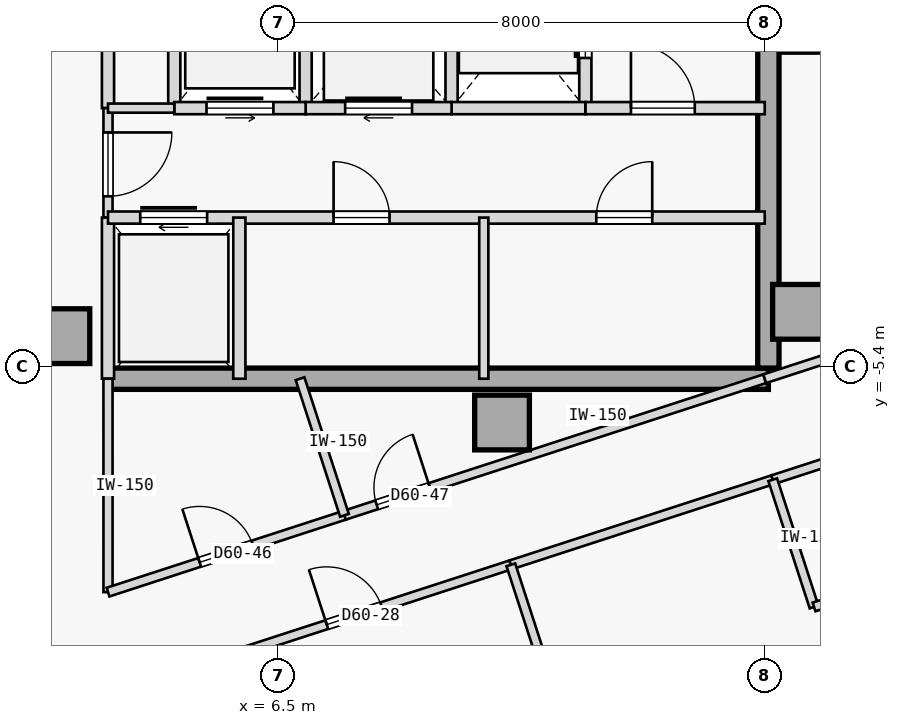
"""IFC4 building model, lengths in metres.
Left out: names, types, materials, properties, quantities, classifications, styles, units other than length and angle.
Written with IfcOpenShell. Run it as: python <this file> out.ifc"""

import sys

from ifc_helpers import new_model, si_unit, direction, frame, frame_2d, origin, origin_2d, place, context, subcontext, project, spatial, rectangle, extrude, element, fill, save


model = new_model("IFC4")
c1 = context("Model", 3, precision=1e-05, world=origin(), true_north=direction((0.0, 1.0)))
c2 = subcontext(c1, "Body", "Model", "MODEL_VIEW")
j1 = project(units=[si_unit("LENGTHUNIT", "METRE"), si_unit("PLANEANGLEUNIT", "RADIAN")], contexts=[c1])
p1 = place(None, origin())
s1 = spatial("IfcSite", under=j1, at=p1, CompositionType="ELEMENT")
p2 = place(p1, origin())
s2 = spatial("IfcBuilding", under=s1, at=p2, CompositionType="ELEMENT")
p3 = place(p2, frame((0.0, 0.0, 227.65)))
s3 = spatial("IfcBuildingStorey", under=s2, at=p3, CompositionType="ELEMENT", Elevation=227.65)
for number, where, z_axis, x_axis in (
    (1, (15.08, -4.5, 0.0), (0.0, 0.0, 1.0), (1.0, 0.0, 0.0)),
    (2, (10.18, -6.32, 0.0), (0.0, 0.0, 1.0), (1.0, 0.0, 0.0)),
    (3, (2.95, -4.9, 0.0), (0.0, 0.0, 1.0), (1.0, 0.0, 0.0)),
):
    element("IfcColumn", number, at=place(p3, frame(where, z_axis=z_axis, x_axis=x_axis)), inside=s3, PredefinedType="COLUMN", context=c2, shape_type="SweptSolid", body=[
        extrude(rectangle(XDim=0.9, YDim=0.9, at=origin_2d()), origin(), (0.0, 0.0, 1.0), 3.35),
    ])
p4 = place(p3, frame((3.7, -5.6, 0.0), z_axis=(0.0, 0.0, 1.0), x_axis=(1.0, 0.0, 0.0)))
e4 = element("IfcWall", 4, at=p4, inside=s3, PredefinedType="SHEAR", context=c2, shape_type="SweptSolid", body=[
    extrude(rectangle(XDim=10.86, YDim=0.35, at=frame_2d((5.43, 0.0))), origin(), (0.0, 0.0, 1.0), 3.125),
])
p5 = place(p3, frame((14.56, -5.425, 0.0), z_axis=(0.0, 0.0, 1.0), x_axis=(0.0, 1.0, 0.0)))
e5 = element("IfcWall", 5, at=p5, inside=s3, PredefinedType="SHEAR", context=c2, shape_type="SweptSolid", body=[
    extrude(rectangle(XDim=10.85, YDim=0.35, at=frame_2d((5.425, 0.0))), origin(), (0.0, 0.0, 1.0), 3.125),
])
p6 = place(p3, frame((3.7, -1.15, 0.0), z_axis=(0.0, 0.0, 1.0), x_axis=(0.0, 1.0, 0.0)))
e6 = element("IfcWall", 6, at=p6, inside=s3, PredefinedType="STANDARD", context=c2, shape_type="SweptSolid", body=[
    extrude(rectangle(XDim=6.75, YDim=0.2, at=frame_2d((3.375, 0.0))), origin(), (0.0, 0.0, 1.0), 3.125),
])
p7 = place(p6, frame((1.1, 0.0, 0.0)))
e7 = element("IfcOpeningElement", 7, at=p7, cuts=e6, PredefinedType="OPENING", context=c2, shape_type="SweptSolid", body=[
    extrude(rectangle(XDim=0.9, YDim=2.15, at=frame_2d((0.45, 1.075))), frame((0.0, 0.11, 0.0), z_axis=(0.0, -1.0, 0.0), x_axis=(1.0, 0.0, 0.0)), (0.0, 0.0, 1.0), 0.22),
])
p8 = place(p6, frame((4.0, 0.0, 0.0)))
e8 = element("IfcOpeningElement", 8, at=p8, cuts=e6, PredefinedType="OPENING", context=c2, shape_type="SweptSolid", body=[
    extrude(rectangle(XDim=0.92, YDim=2.15, at=frame_2d((0.46, 1.075))), frame((0.0, 0.11, 0.0), z_axis=(0.0, -1.0, 0.0), x_axis=(1.0, 0.0, 0.0)), (0.0, 0.0, 1.0), 0.22),
])
p9 = place(p3, frame((3.7, -2.95, 0.0), z_axis=(0.0, 0.0, 1.0), x_axis=(0.0, 1.0, 0.0)))
e9 = element("IfcWall", 9, at=p9, inside=s3, PredefinedType="PARTITIONING", context=c2, shape_type="SweptSolid", body=[
    extrude(rectangle(XDim=1.8, YDim=0.15, at=frame_2d((0.9, 0.0))), origin(), (0.0, 0.0, 1.0), 3.125),
])
p10 = place(p9, frame((0.35, 0.0, 0.0)))
e10 = element("IfcOpeningElement", 10, at=p10, cuts=e9, PredefinedType="OPENING", context=c2, shape_type="SweptSolid", body=[
    extrude(rectangle(XDim=1.05, YDim=2.18, at=frame_2d((0.525, 1.09))), frame((0.0, 0.085, 0.0), z_axis=(0.0, -1.0, 0.0), x_axis=(1.0, 0.0, 0.0)), (0.0, 0.0, 1.0), 0.17),
])
p11 = place(p3, frame((3.7, -5.6, 0.0), z_axis=(0.0, 0.0, 1.0), x_axis=(0.0, 1.0, 0.0)))
e11 = element("IfcWall", 11, at=p11, inside=s3, PredefinedType="STANDARD", context=c2, shape_type="SweptSolid", body=[
    extrude(rectangle(XDim=2.65, YDim=0.2, at=frame_2d((1.325, 0.0))), origin(), (0.0, 0.0, 1.0), 3.125),
])
p12 = place(p3, frame((11.55, -1.15, 0.0), z_axis=(0.0, 0.0, 1.0), x_axis=(0.0, 1.0, 0.0)))
e12 = element("IfcWall", 12, at=p12, inside=s3, PredefinedType="STANDARD", context=c2, shape_type="SweptSolid", body=[
    extrude(rectangle(XDim=2.75, YDim=0.2, at=frame_2d((1.375, 0.0))), origin(), (0.0, 0.0, 1.0), 3.125),
])
p13 = place(p12, frame((0.825, 0.0, 0.0)))
e13 = element("IfcOpeningElement", 13, at=p13, cuts=e12, PredefinedType="OPENING", context=c2, shape_type="SweptSolid", body=[
    extrude(rectangle(XDim=1.1, YDim=2.15, at=frame_2d((0.55, 1.075))), frame((0.0, 0.11, 0.0), z_axis=(0.0, -1.0, 0.0), x_axis=(1.0, 0.0, 0.0)), (0.0, 0.0, 1.0), 0.22),
])
p14 = place(p3, frame((9.35, -1.15, 0.0), z_axis=(0.0, 0.0, 1.0), x_axis=(0.0, 1.0, 0.0)))
e14 = element("IfcWall", 14, at=p14, inside=s3, PredefinedType="STANDARD", context=c2, shape_type="SweptSolid", body=[
    extrude(rectangle(XDim=2.75, YDim=0.2, at=frame_2d((1.375, 0.0))), origin(), (0.0, 0.0, 1.0), 3.125),
])
p15 = place(p3, frame((11.55, -1.15, 0.0), z_axis=(0.0, 0.0, 1.0), x_axis=(1.0, 0.0, 0.0)))
e15 = element("IfcWall", 15, at=p15, inside=s3, PredefinedType="STANDARD", context=c2, shape_type="SweptSolid", body=[
    extrude(rectangle(XDim=2.95, YDim=0.2, at=frame_2d((1.475, 0.0))), origin(), (0.0, 0.0, 1.0), 3.125),
])
p16 = place(p15, frame((0.75, 0.0, 0.0)))
e16 = element("IfcOpeningElement", 16, at=p16, cuts=e15, PredefinedType="OPENING", context=c2, shape_type="SweptSolid", body=[
    extrude(rectangle(XDim=1.05, YDim=2.18, at=frame_2d((0.525, 1.09))), frame((0.0, 0.11, 0.0), z_axis=(0.0, -1.0, 0.0), x_axis=(1.0, 0.0, 0.0)), (0.0, 0.0, 1.0), 0.22),
])
p17 = place(p3, frame((9.35, -1.15, 0.0), z_axis=(0.0, 0.0, 1.0), x_axis=(1.0, 0.0, 0.0)))
e17 = element("IfcWall", 17, at=p17, inside=s3, PredefinedType="STANDARD", context=c2, shape_type="SweptSolid", body=[
    extrude(rectangle(XDim=2.2, YDim=0.2, at=frame_2d((1.1, 0.0))), origin(), (0.0, 0.0, 1.0), 3.125),
])
p18 = place(p3, frame((6.95, -1.15, 0.0), z_axis=(0.0, 0.0, 1.0), x_axis=(0.0, 1.0, 0.0)))
e18 = element("IfcWall", 18, at=p18, inside=s3, PredefinedType="STANDARD", context=c2, shape_type="SweptSolid", body=[
    extrude(rectangle(XDim=2.75, YDim=0.2, at=frame_2d((1.375, 0.0))), origin(), (0.0, 0.0, 1.0), 3.125),
])
p19 = place(p3, frame((6.95, -1.15, 0.0), z_axis=(0.0, 0.0, 1.0), x_axis=(1.0, 0.0, 0.0)))
e19 = element("IfcWall", 19, at=p19, inside=s3, PredefinedType="STANDARD", context=c2, shape_type="SweptSolid", body=[
    extrude(rectangle(XDim=2.4, YDim=0.2, at=frame_2d((1.2, 0.0))), origin(), (0.0, 0.0, 1.0), 3.125),
])
p20 = place(p19, frame((0.65, 0.0, 0.0)))
e20 = element("IfcOpeningElement", 20, at=p20, cuts=e19, PredefinedType="OPENING", context=c2, shape_type="SweptSolid", body=[
    extrude(rectangle(XDim=1.1, YDim=2.15, at=frame_2d((0.55, 1.075))), frame((0.0, 0.11, 0.0), z_axis=(0.0, -1.0, 0.0), x_axis=(1.0, 0.0, 0.0)), (0.0, 0.0, 1.0), 0.22),
])
p21 = place(p3, frame((4.79, -1.15, 0.0), z_axis=(0.0, 0.0, 1.0), x_axis=(0.0, 1.0, 0.0)))
e21 = element("IfcWall", 21, at=p21, inside=s3, PredefinedType="STANDARD", context=c2, shape_type="SweptSolid", body=[
    extrude(rectangle(XDim=2.75, YDim=0.2, at=frame_2d((1.375, 0.0))), origin(), (0.0, 0.0, 1.0), 3.125),
])
p22 = place(p3, frame((4.79, -1.15, 0.0), z_axis=(0.0, 0.0, 1.0), x_axis=(1.0, 0.0, 0.0)))
e22 = element("IfcWall", 22, at=p22, inside=s3, PredefinedType="STANDARD", context=c2, shape_type="SweptSolid", body=[
    extrude(rectangle(XDim=2.16, YDim=0.2, at=frame_2d((1.08, 0.0))), origin(), (0.0, 0.0, 1.0), 3.125),
])
p23 = place(p22, frame((0.53, 0.0, 0.0)))
e23 = element("IfcOpeningElement", 23, at=p23, cuts=e22, PredefinedType="OPENING", context=c2, shape_type="SweptSolid", body=[
    extrude(rectangle(XDim=1.1, YDim=2.15, at=frame_2d((0.55, 1.075))), frame((0.0, 0.11, 0.0), z_axis=(0.0, -1.0, 0.0), x_axis=(1.0, 0.0, 0.0)), (0.0, 0.0, 1.0), 0.22),
])
p24 = place(p3, frame((3.7, -1.15, 0.0), z_axis=(0.0, 0.0, 1.0), x_axis=(1.0, 0.0, 0.0)))
e24 = element("IfcWall", 24, at=p24, inside=s3, PredefinedType="PARTITIONING", context=c2, shape_type="SweptSolid", body=[
    extrude(rectangle(XDim=1.09, YDim=0.15, at=frame_2d((0.545, 0.0))), origin(), (0.0, 0.0, 1.0), 3.125),
])
p25 = place(p3, frame((3.7, -2.95, 0.0), z_axis=(0.0, 0.0, 1.0), x_axis=(1.0, 0.0, 0.0)))
e25 = element("IfcWall", 25, at=p25, inside=s3, PredefinedType="STANDARD", context=c2, shape_type="SweptSolid", body=[
    extrude(rectangle(XDim=10.8, YDim=0.2, at=frame_2d((5.4, 0.0))), origin(), (0.0, 0.0, 1.0), 3.125),
])
p26 = place(p25, frame((0.53, 0.0, 0.0)))
e26 = element("IfcOpeningElement", 26, at=p26, cuts=e25, PredefinedType="OPENING", context=c2, shape_type="SweptSolid", body=[
    extrude(rectangle(XDim=1.1, YDim=2.15, at=frame_2d((0.55, 1.075))), frame((0.0, 0.11, 0.0), z_axis=(0.0, -1.0, 0.0), x_axis=(1.0, 0.0, 0.0)), (0.0, 0.0, 1.0), 0.22),
])
p27 = place(p25, frame((3.71, 0.0, 0.0)))
e27 = element("IfcOpeningElement", 27, at=p27, cuts=e25, PredefinedType="OPENING", context=c2, shape_type="SweptSolid", body=[
    extrude(rectangle(XDim=0.92, YDim=2.15, at=frame_2d((0.46, 1.075))), frame((0.0, 0.11, 0.0), z_axis=(0.0, -1.0, 0.0), x_axis=(1.0, 0.0, 0.0)), (0.0, 0.0, 1.0), 0.22),
])
p28 = place(p25, frame((8.03, 0.0, 0.0)))
e28 = element("IfcOpeningElement", 28, at=p28, cuts=e25, PredefinedType="OPENING", context=c2, shape_type="SweptSolid", body=[
    extrude(rectangle(XDim=0.92, YDim=2.15, at=frame_2d((0.46, 1.075))), frame((0.0, 0.11, 0.0), z_axis=(0.0, -1.0, 0.0), x_axis=(1.0, 0.0, 0.0)), (0.0, 0.0, 1.0), 0.22),
])
p29 = place(p3, frame((5.86, -5.6, 0.0), z_axis=(0.0, 0.0, 1.0), x_axis=(0.0, 1.0, 0.0)))
e29 = element("IfcWall", 29, at=p29, inside=s3, PredefinedType="STANDARD", context=c2, shape_type="SweptSolid", body=[
    extrude(rectangle(XDim=2.65, YDim=0.2, at=frame_2d((1.325, 0.0))), origin(), (0.0, 0.0, 1.0), 3.125),
])
p30 = place(p3, frame((9.88, -5.6, 0.0), z_axis=(0.0, 0.0, 1.0), x_axis=(0.0, 1.0, 0.0)))
e30 = element("IfcWall", 30, at=p30, inside=s3, PredefinedType="PARTITIONING", context=c2, shape_type="SweptSolid", body=[
    extrude(rectangle(XDim=2.65, YDim=0.15, at=frame_2d((1.325, 0.0))), origin(), (0.0, 0.0, 1.0), 3.125),
])
p31 = place(p3, frame((5.174, -10.334, 0.0), z_axis=(0.0, 0.0, 1.0), x_axis=(0.951058579685, 0.30901064384, 0.0)))
e31 = element("IfcWall", 31, at=p31, inside=s3, PredefinedType="PARTITIONING", context=c2, shape_type="SweptSolid", body=[
    extrude(rectangle(XDim=5.416, YDim=0.15, at=frame_2d((2.708, 0.0))), origin(), (0.0, 0.0, 1.0), 3.125),
])
p32 = place(p31, frame((2.233, 0.0, 0.0)))
e32 = element("IfcOpeningElement", 32, at=p32, cuts=e31, PredefinedType="OPENING", context=c2, shape_type="SweptSolid", body=[
    extrude(rectangle(XDim=0.95, YDim=2.15, at=frame_2d((0.475, 1.075))), frame((0.0, 0.085, 0.0), z_axis=(0.0, -1.0, 0.0), x_axis=(1.0, 0.0, 0.0)), (0.0, 0.0, 1.0), 0.17),
])
p33 = place(p3, frame((10.325, -8.66, 0.0), z_axis=(0.0, 0.0, 1.0), x_axis=(0.95106061278, 0.309004386407, 0.0)))
e33 = element("IfcWall", 33, at=p33, inside=s3, PredefinedType="PARTITIONING", context=c2, shape_type="SweptSolid", body=[
    extrude(rectangle(XDim=4.528, YDim=0.15, at=frame_2d((2.264, 0.0))), origin(), (0.0, 0.0, 1.0), 3.125),
])
p34 = place(p3, frame((14.631, -7.261, 0.0), z_axis=(0.0, 0.0, 1.0), x_axis=(0.951066131077, 0.308987401554, 0.0)))
e34 = element("IfcWall", 34, at=p34, inside=s3, PredefinedType="PARTITIONING", context=c2, shape_type="SweptSolid", body=[
    extrude(rectangle(XDim=2.35, YDim=0.15, at=frame_2d((1.175, 0.0))), origin(), (0.0, 0.0, 1.0), 3.125),
])
p35 = place(p3, frame((3.7, -9.109, 0.0), z_axis=(0.0, 0.0, 1.0), x_axis=(-0.000139130433, 0.999999990321, 0.0)))
e35 = element("IfcWall", 35, at=p35, inside=s3, PredefinedType="PARTITIONING", context=c2, shape_type="SweptSolid", body=[
    extrude(rectangle(XDim=3.51, YDim=0.15, at=frame_2d((1.755, 0.0))), origin(), (0.0, 0.0, 1.0), 3.125),
])
p36 = place(p3, frame((3.7, -9.109, 0.0), z_axis=(0.0, 0.0, 1.0), x_axis=(0.95106259184, 0.308998295145, 0.0)))
e36 = element("IfcWall", 36, at=p36, inside=s3, PredefinedType="PARTITIONING", context=c2, shape_type="SweptSolid", body=[
    extrude(rectangle(XDim=4.088, YDim=0.15, at=frame_2d((2.044, 0.0))), origin(), (0.0, 0.0, 1.0), 3.125),
])
p37 = place(p36, frame((1.584, 0.0, 0.0)))
e37 = element("IfcOpeningElement", 37, at=p37, cuts=e36, PredefinedType="OPENING", context=c2, shape_type="SweptSolid", body=[
    extrude(rectangle(XDim=0.92, YDim=2.15, at=frame_2d((0.46, 1.075))), frame((0.0, 0.085, 0.0), z_axis=(0.0, -1.0, 0.0), x_axis=(1.0, 0.0, 0.0)), (0.0, 0.0, 1.0), 0.17),
])
p38 = place(p3, frame((7.588, -7.846, 0.0), z_axis=(0.0, 0.0, 1.0), x_axis=(0.951058013903, 0.309012385174, 0.0)))
e38 = element("IfcWall", 38, at=p38, inside=s3, PredefinedType="PARTITIONING", context=c2, shape_type="SweptSolid", body=[
    extrude(rectangle(XDim=7.267, YDim=0.15, at=frame_2d((3.634, 0.0))), origin(), (0.0, 0.0, 1.0), 3.125),
])
p39 = place(p38, frame((0.557, 0.0, 0.0)))
e39 = element("IfcOpeningElement", 39, at=p39, cuts=e38, PredefinedType="OPENING", context=c2, shape_type="SweptSolid", body=[
    extrude(rectangle(XDim=0.92, YDim=2.15, at=frame_2d((0.46, 1.075))), frame((0.0, 0.085, 0.0), z_axis=(0.0, -1.0, 0.0), x_axis=(1.0, 0.0, 0.0)), (0.0, 0.0, 1.0), 0.17),
])
p40 = place(p3, frame((14.5, -5.6, 0.0), z_axis=(0.0, 0.0, 1.0), x_axis=(0.951047546178, 0.309044600193, 0.0)))
e40 = element("IfcWall", 40, at=p40, inside=s3, PredefinedType="PARTITIONING", context=c2, shape_type="SweptSolid", body=[
    extrude(rectangle(XDim=3.461, YDim=0.15, at=frame_2d((1.73, 0.0))), origin(), (0.0, 0.0, 1.0), 3.125),
])
p41 = place(p40, frame((1.79, 0.0, 0.0)))
e41 = element("IfcOpeningElement", 41, at=p41, cuts=e40, PredefinedType="OPENING", context=c2, shape_type="SweptSolid", body=[
    extrude(rectangle(XDim=0.92, YDim=2.15, at=frame_2d((0.46, 1.075))), frame((0.0, 0.085, 0.0), z_axis=(0.0, -1.0, 0.0), x_axis=(1.0, 0.0, 0.0)), (0.0, 0.0, 1.0), 0.17),
])
p42 = place(p3, frame((13.372, -18.04, 0.0), z_axis=(0.0, 0.0, 1.0), x_axis=(-0.308999867152, 0.951062081097, 0.0)))
e42 = element("IfcWall", 42, at=p42, inside=s3, PredefinedType="PARTITIONING", context=c2, shape_type="SweptSolid", body=[
    extrude(rectangle(XDim=9.862, YDim=0.15, at=frame_2d((4.931, 0.0))), origin(), (0.0, 0.0, 1.0), 3.125),
])
p43 = place(p3, frame((15.311, -9.353, 0.0), z_axis=(0.0, 0.0, 1.0), x_axis=(-0.308960600764, 0.951074837842, 0.0)))
e43 = element("IfcWall", 43, at=p43, inside=s3, PredefinedType="PARTITIONING", context=c2, shape_type="SweptSolid", body=[
    extrude(rectangle(XDim=2.2, YDim=0.15, at=frame_2d((1.1, 0.0))), origin(), (0.0, 0.0, 1.0), 3.125),
])
p44 = place(p3, frame((15.311, -9.353, 0.0), z_axis=(0.0, 0.0, 1.0), x_axis=(0.951076048914, 0.308956872689, 0.0)))
e44 = element("IfcWall", 44, at=p44, inside=s3, PredefinedType="PARTITIONING", context=c2, shape_type="SweptSolid", body=[
    extrude(rectangle(XDim=2.35, YDim=0.15, at=frame_2d((1.175, 0.0))), origin(), (0.0, 0.0, 1.0), 3.125),
])
p45 = place(p44, frame((0.735, 0.0, 0.0)))
e45 = element("IfcOpeningElement", 45, at=p45, cuts=e44, PredefinedType="OPENING", context=c2, shape_type="SweptSolid", body=[
    extrude(rectangle(XDim=0.88, YDim=2.15, at=frame_2d((0.44, 1.075))), frame((0.0, 0.085, 0.0), z_axis=(0.0, -1.0, 0.0), x_axis=(1.0, 0.0, 0.0)), (0.0, 0.0, 1.0), 0.17),
])
p46 = place(p3, frame((7.588, -7.846, 0.0), z_axis=(0.0, 0.0, 1.0), x_axis=(-0.309055688452, 0.951043942957, 0.0)))
e46 = element("IfcWall", 46, at=p46, inside=s3, PredefinedType="PARTITIONING", context=c2, shape_type="SweptSolid", body=[
    extrude(rectangle(XDim=2.362, YDim=0.15, at=frame_2d((1.181, 0.0))), origin(), (0.0, 0.0, 1.0), 3.125),
])
p47 = place(p16, origin())
e47 = element("IfcDoor", 47, at=p47, inside=s3, OperationType="SINGLE_SWING_LEFT", PredefinedType="DOOR", context=c2, shape_type="SweptSolid", body=[
    extrude(rectangle(XDim=1.05, YDim=2.18, at=frame_2d((0.525, 1.09))), frame((0.0, 0.025, 0.0), z_axis=(0.0, -1.0, 0.0), x_axis=(1.0, 0.0, 0.0)), (0.0, 0.0, 1.0), 0.05),
])
fill(e16, e47)
p48 = place(p10, frame((1.05, 0.0, 0.0), z_axis=(0.0, 0.0, 1.0), x_axis=(-1.0, 0.0, 0.0)))
e48 = element("IfcDoor", 48, at=p48, inside=s3, OperationType="SINGLE_SWING_RIGHT", PredefinedType="DOOR", context=c2, shape_type="SweptSolid", body=[
    extrude(rectangle(XDim=1.05, YDim=2.18, at=frame_2d((0.525, 1.09))), frame((0.0, 0.025, 0.0), z_axis=(0.0, -1.0, 0.0), x_axis=(1.0, 0.0, 0.0)), (0.0, 0.0, 1.0), 0.05),
])
fill(e10, e48)
p49 = place(p13, origin())
e49 = element("IfcDoor", 49, at=p49, inside=s3, OperationType="SLIDING_TO_RIGHT", PredefinedType="DOOR", context=c2, shape_type="SweptSolid", body=[
    extrude(rectangle(XDim=1.1, YDim=2.15, at=frame_2d((0.55, 1.075))), frame((0.0, 0.025, 0.0), z_axis=(0.0, -1.0, 0.0), x_axis=(1.0, 0.0, 0.0)), (0.0, 0.0, 1.0), 0.05),
])
fill(e13, e49)
p50 = place(p20, origin())
e50 = element("IfcDoor", 50, at=p50, inside=s3, OperationType="SLIDING_TO_RIGHT", PredefinedType="DOOR", context=c2, shape_type="SweptSolid", body=[
    extrude(rectangle(XDim=1.1, YDim=2.15, at=frame_2d((0.55, 1.075))), frame((0.0, 0.025, 0.0), z_axis=(0.0, -1.0, 0.0), x_axis=(1.0, 0.0, 0.0)), (0.0, 0.0, 1.0), 0.05),
])
fill(e20, e50)
p51 = place(p23, origin())
e51 = element("IfcDoor", 51, at=p51, inside=s3, OperationType="SLIDING_TO_LEFT", PredefinedType="DOOR", context=c2, shape_type="SweptSolid", body=[
    extrude(rectangle(XDim=1.1, YDim=2.15, at=frame_2d((0.55, 1.075))), frame((0.0, 0.025, 0.0), z_axis=(0.0, -1.0, 0.0), x_axis=(1.0, 0.0, 0.0)), (0.0, 0.0, 1.0), 0.05),
])
fill(e23, e51)
p52 = place(p26, origin())
e52 = element("IfcDoor", 52, at=p52, inside=s3, OperationType="SLIDING_TO_RIGHT", PredefinedType="DOOR", context=c2, shape_type="SweptSolid", body=[
    extrude(rectangle(XDim=1.1, YDim=2.15, at=frame_2d((0.55, 1.075))), frame((0.0, 0.025, 0.0), z_axis=(0.0, -1.0, 0.0), x_axis=(1.0, 0.0, 0.0)), (0.0, 0.0, 1.0), 0.05),
])
fill(e26, e52)
p53 = place(p27, origin())
e53 = element("IfcDoor", 53, at=p53, inside=s3, OperationType="SINGLE_SWING_LEFT", PredefinedType="DOOR", context=c2, shape_type="SweptSolid", body=[
    extrude(rectangle(XDim=0.92, YDim=2.15, at=frame_2d((0.46, 1.075))), frame((0.0, 0.025, 0.0), z_axis=(0.0, -1.0, 0.0), x_axis=(1.0, 0.0, 0.0)), (0.0, 0.0, 1.0), 0.05),
])
fill(e27, e53)
p54 = place(p28, origin())
e54 = element("IfcDoor", 54, at=p54, inside=s3, OperationType="SINGLE_SWING_RIGHT", PredefinedType="DOOR", context=c2, shape_type="SweptSolid", body=[
    extrude(rectangle(XDim=0.92, YDim=2.15, at=frame_2d((0.46, 1.075))), frame((0.0, 0.025, 0.0), z_axis=(0.0, -1.0, 0.0), x_axis=(1.0, 0.0, 0.0)), (0.0, 0.0, 1.0), 0.05),
])
fill(e28, e54)
p55 = place(p32, origin())
e55 = element("IfcDoor", 55, at=p55, inside=s3, OperationType="SINGLE_SWING_LEFT", PredefinedType="DOOR", context=c2, shape_type="SweptSolid", body=[
    extrude(rectangle(XDim=0.95, YDim=2.15, at=frame_2d((0.475, 1.075))), frame((0.0, 0.025, 0.0), z_axis=(0.0, -1.0, 0.0), x_axis=(1.0, 0.0, 0.0)), (0.0, 0.0, 1.0), 0.05),
])
fill(e32, e55)
p56 = place(p37, origin())
e56 = element("IfcDoor", 56, at=p56, inside=s3, OperationType="SINGLE_SWING_LEFT", PredefinedType="DOOR", context=c2, shape_type="SweptSolid", body=[
    extrude(rectangle(XDim=0.92, YDim=2.15, at=frame_2d((0.46, 1.075))), frame((0.0, 0.025, 0.0), z_axis=(0.0, -1.0, 0.0), x_axis=(1.0, 0.0, 0.0)), (0.0, 0.0, 1.0), 0.05),
])
fill(e37, e56)
p57 = place(p39, origin())
e57 = element("IfcDoor", 57, at=p57, inside=s3, OperationType="SINGLE_SWING_RIGHT", PredefinedType="DOOR", context=c2, shape_type="SweptSolid", body=[
    extrude(rectangle(XDim=0.92, YDim=2.15, at=frame_2d((0.46, 1.075))), frame((0.0, 0.025, 0.0), z_axis=(0.0, -1.0, 0.0), x_axis=(1.0, 0.0, 0.0)), (0.0, 0.0, 1.0), 0.05),
])
fill(e39, e57)
save(model, sys.argv[1])
